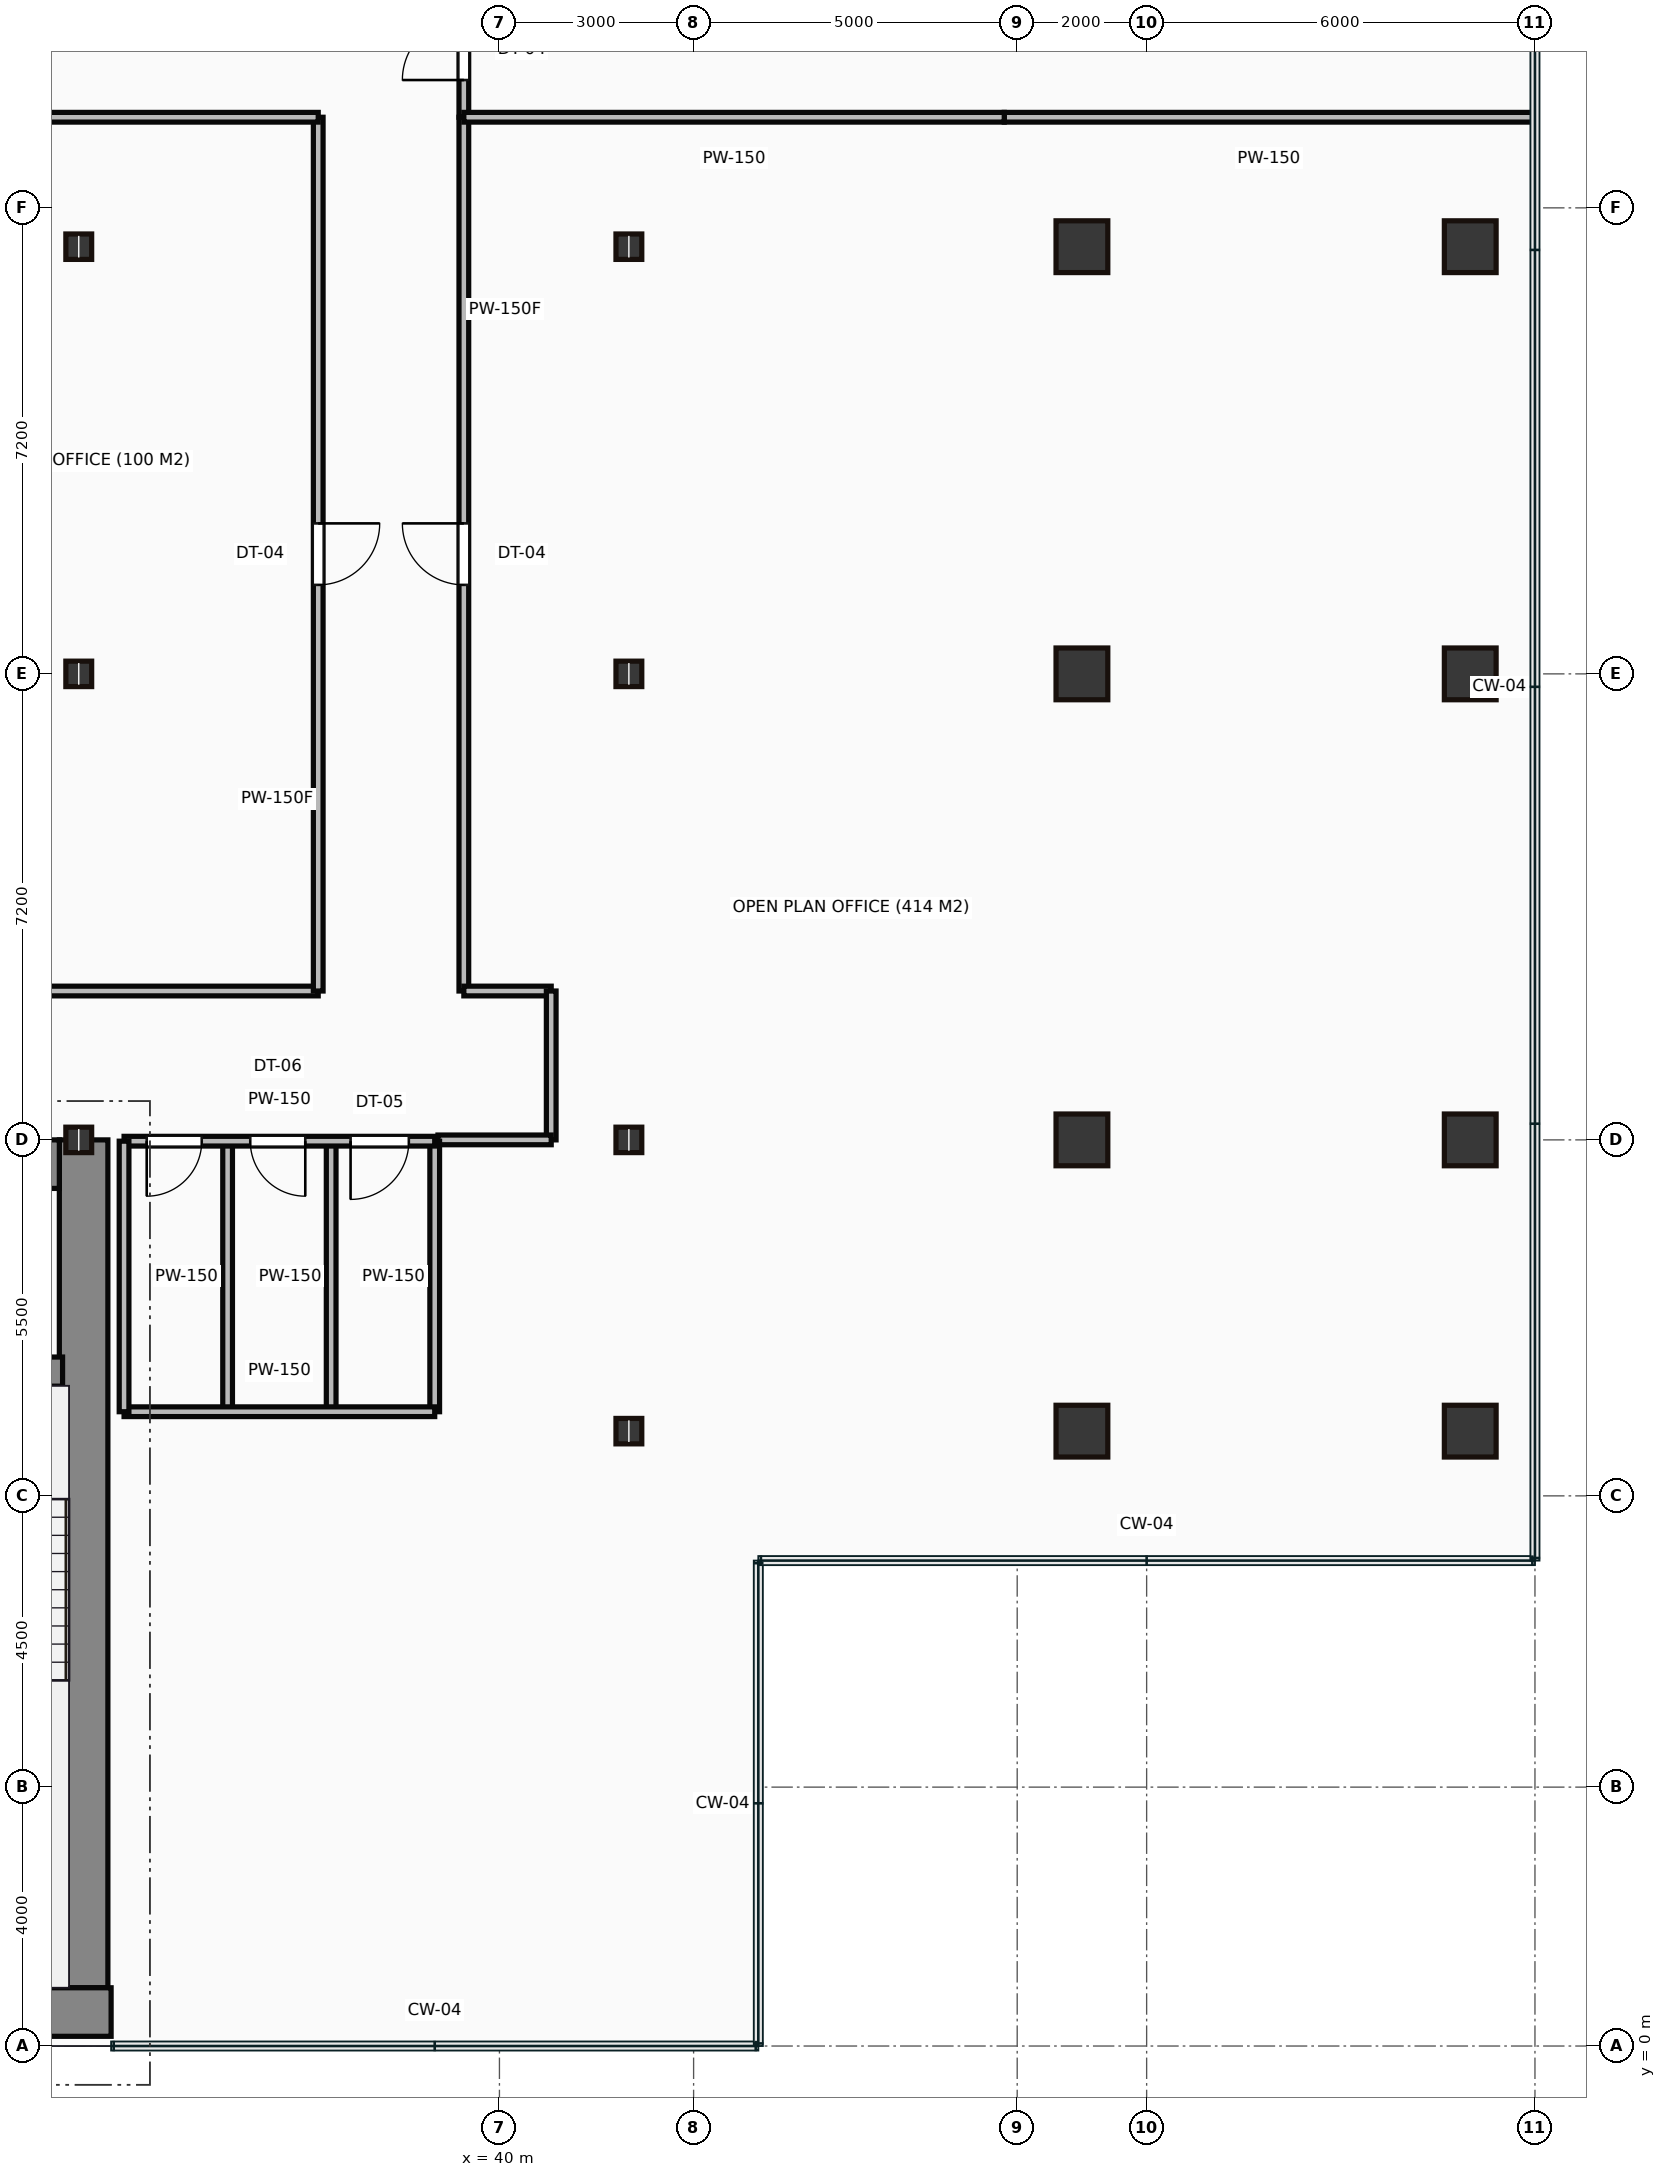
"""IFC4 building model, lengths in metres.
Left out: names, types, materials, properties, quantities, classifications, styles, units other than length and angle.
Written with IfcOpenShell. Run it as: python <this file> out.ifc"""

import sys

from ifc_helpers import new_model, si_unit, direction, frame, frame_2d, origin, origin_2d, place, context, subcontext, project, spatial, rectangle, hollow_rectangle, i_section, extrude, source, transform, mapped, element, fill, save


model = new_model("IFC4")
c1 = context("Model", 3, precision=1e-05, world=origin(), true_north=direction((0.0, 1.0)))
c2 = subcontext(c1, "Body", "Model", "MODEL_VIEW")
j1 = project(units=[si_unit("LENGTHUNIT", "METRE"), si_unit("PLANEANGLEUNIT", "RADIAN")], contexts=[c1])
p1 = place(None, origin())
s1 = spatial("IfcSite", under=j1, at=p1, CompositionType="ELEMENT")
p2 = place(p1, origin())
s2 = spatial("IfcBuilding", under=s1, at=p2, CompositionType="ELEMENT")
p3 = place(p2, frame((0.0, 0.0, 103.25)))
s3 = spatial("IfcBuildingStorey", under=s2, at=p3, CompositionType="ELEMENT", Elevation=103.25)
m1 = source(origin(), c2, "Body", "SweptSolid", [
    extrude(rectangle(XDim=29.5, YDim=0.75, at=frame_2d((14.75, 0.0))), origin(), (0.0, 0.0, 1.0), 3.65),
])
p4 = place(p3, frame((4.5, 0.525, 0.0), z_axis=(0.0, 0.0, 1.0), x_axis=(1.0, 0.0, 0.0)))
e1 = element("IfcWall", 1, at=p4, inside=s3, PredefinedType="SHEAR", context=c2, shape_type="MappedRepresentation", body=[
    mapped(m1, transform((0.0, 0.0, 0.0))),
])
m2 = source(origin(), c2, "Body", "SweptSolid", [
    extrude(rectangle(XDim=13.1, YDim=0.75, at=frame_2d((6.55, 0.0))), origin(), (0.0, 0.0, 1.0), 3.65),
])
p5 = place(p3, frame((33.575, 0.9, 0.0), z_axis=(0.0, 0.0, 1.0), x_axis=(0.0, 1.0, 0.0)))
e2 = element("IfcWall", 2, at=p5, inside=s3, PredefinedType="SHEAR", context=c2, shape_type="MappedRepresentation", body=[
    mapped(m2, transform((0.0, 0.0, 0.0))),
])
m3 = source(origin(), c2, "Body", "SweptSolid", [
    extrude(rectangle(XDim=12.6, YDim=0.75, at=frame_2d((6.3, 0.0))), origin(), (0.0, 0.0, 1.0), 3.65),
])
p6 = place(p3, frame((20.6, 13.625, 0.0), z_axis=(0.0, 0.0, 1.0), x_axis=(1.0, 0.0, 0.0)))
e3 = element("IfcWall", 3, at=p6, inside=s3, PredefinedType="SHEAR", context=c2, shape_type="MappedRepresentation", body=[
    mapped(m3, transform((0.0, 0.0, 0.0))),
])
p7 = place(p6, frame((9.25, 0.0, 0.0)))
e4 = element("IfcOpeningElement", 4, at=p7, cuts=e3, PredefinedType="OPENING", context=c2, shape_type="SweptSolid", body=[
    extrude(rectangle(XDim=1.1, YDim=2.15, at=frame_2d((0.55, 1.075))), frame((0.0, 0.385, 0.0), z_axis=(0.0, -1.0, 0.0), x_axis=(1.0, 0.0, 0.0)), (0.0, 0.0, 1.0), 0.77),
])
m4 = source(origin(), c2, "Body", "SweptSolid", [
    extrude(rectangle(XDim=3.39, YDim=0.45, at=frame_2d((1.695, 0.0))), origin(), (0.0, 0.0, 1.0), 3.65),
])
p8 = place(p3, frame((29.86, 10.42, 0.0), z_axis=(0.0, 0.0, 1.0), x_axis=(1.0, 0.0, 0.0)))
e5 = element("IfcWall", 5, at=p8, inside=s3, PredefinedType="SHEAR", context=c2, shape_type="MappedRepresentation", body=[
    mapped(m4, transform((0.0, 0.0, 0.0))),
])
p9 = place(p8, frame((1.1, 0.0, 0.0)))
e6 = element("IfcOpeningElement", 6, at=p9, cuts=e5, PredefinedType="OPENING", context=c2, shape_type="SweptSolid", body=[
    extrude(rectangle(XDim=1.1, YDim=2.15, at=frame_2d((0.55, 1.075))), frame((0.0, 0.235, 0.0), z_axis=(0.0, -1.0, 0.0), x_axis=(1.0, 0.0, 0.0)), (0.0, 0.0, 1.0), 0.47),
])
m5 = source(origin(), c2, "Body", "SweptSolid", [
    extrude(i_section(OverallWidth=0.399, OverallDepth=0.393, WebThickness=0.023, FlangeThickness=0.037, at=origin_2d()), origin(), (0.0, 0.0, 1.0), 3.65),
])
for number, where, z_axis, x_axis in (
    (7, (33.5, 14.0, 0.0), (0.0, 0.0, 1.0), (1.0, 0.0, 0.0)),
    (8, (33.5, 21.2, 0.0), (0.0, 0.0, 1.0), (1.0, 0.0, 0.0)),
    (9, (33.5, 27.8, 0.0), (0.0, 0.0, 1.0), (1.0, 0.0, 0.0)),
    (10, (42.0, 9.5, 0.0), (0.0, 0.0, 1.0), (1.0, 0.0, 0.0)),
    (11, (42.0, 14.0, 0.0), (0.0, 0.0, 1.0), (1.0, 0.0, 0.0)),
    (12, (42.0, 21.2, 0.0), (0.0, 0.0, 1.0), (1.0, 0.0, 0.0)),
    (13, (42.0, 27.8, 0.0), (0.0, 0.0, 1.0), (1.0, 0.0, 0.0)),
):
    element("IfcColumn", number, at=place(p3, frame(where, z_axis=z_axis, x_axis=x_axis)), inside=s3, PredefinedType="COLUMN", context=c2, shape_type="MappedRepresentation", body=[
        mapped(m5, transform((0.0, 0.0, 0.0))),
    ])
m6 = source(origin(), c2, "Body", "SweptSolid", [
    extrude(hollow_rectangle(XDim=0.8, YDim=0.8, WallThickness=0.04, at=origin_2d()), origin(), (0.0, 0.0, 1.0), 3.65),
])
for number, where, z_axis, x_axis in (
    (14, (49.0, 9.5, 0.0), (0.0, 0.0, 1.0), (1.0, 0.0, 0.0)),
    (15, (49.0, 14.0, 0.0), (0.0, 0.0, 1.0), (1.0, 0.0, 0.0)),
    (16, (49.0, 21.2, 0.0), (0.0, 0.0, 1.0), (1.0, 0.0, 0.0)),
    (17, (49.0, 27.8, 0.0), (0.0, 0.0, 1.0), (1.0, 0.0, 0.0)),
    (18, (55.0, 9.5, 0.0), (0.0, 0.0, 1.0), (1.0, 0.0, 0.0)),
    (19, (55.0, 14.0, 0.0), (0.0, 0.0, 1.0), (1.0, 0.0, 0.0)),
    (20, (55.0, 21.2, 0.0), (0.0, 0.0, 1.0), (1.0, 0.0, 0.0)),
    (21, (55.0, 27.8, 0.0), (0.0, 0.0, 1.0), (1.0, 0.0, 0.0)),
):
    element("IfcColumn", number, at=place(p3, frame(where, z_axis=z_axis, x_axis=x_axis)), inside=s3, PredefinedType="COLUMN", context=c2, shape_type="MappedRepresentation", body=[
        mapped(m6, transform((0.0, 0.0, 0.0))),
    ])
m7 = source(origin(), c2, "Body", "SweptSolid", [
    extrude(rectangle(XDim=4.8, YDim=0.15, at=frame_2d((2.4, 0.0))), origin(), (0.0, 0.0, 1.0), 2.702),
])
p10 = place(p3, frame((34.2, 13.98, 0.0), z_axis=(0.0, 0.0, 1.0), x_axis=(1.0, 0.0, 0.0)))
e22 = element("IfcWall", 22, at=p10, inside=s3, PredefinedType="PARTITIONING", context=c2, shape_type="MappedRepresentation", body=[
    mapped(m7, transform((0.0, 0.0, 0.0))),
])
p11 = place(p10, frame((0.35, 0.0, 0.0)))
e23 = element("IfcOpeningElement", 23, at=p11, cuts=e22, PredefinedType="OPENING", context=c2, shape_type="SweptSolid", body=[
    extrude(rectangle(XDim=0.85, YDim=2.1, at=frame_2d((0.425, 1.05))), frame((0.0, 0.085, 0.0), z_axis=(0.0, -1.0, 0.0), x_axis=(1.0, 0.0, 0.0)), (0.0, 0.0, 1.0), 0.17),
])
p12 = place(p10, frame((1.95, 0.0, 0.0)))
e24 = element("IfcOpeningElement", 24, at=p12, cuts=e22, PredefinedType="OPENING", context=c2, shape_type="SweptSolid", body=[
    extrude(rectangle(XDim=0.85, YDim=2.1, at=frame_2d((0.425, 1.05))), frame((0.0, 0.085, 0.0), z_axis=(0.0, -1.0, 0.0), x_axis=(1.0, 0.0, 0.0)), (0.0, 0.0, 1.0), 0.17),
])
p13 = place(p10, frame((3.5, 0.0, 0.0)))
e25 = element("IfcOpeningElement", 25, at=p13, cuts=e22, PredefinedType="OPENING", context=c2, shape_type="SweptSolid", body=[
    extrude(rectangle(XDim=0.9, YDim=2.1, at=frame_2d((0.45, 1.05))), frame((0.0, 0.085, 0.0), z_axis=(0.0, -1.0, 0.0), x_axis=(1.0, 0.0, 0.0)), (0.0, 0.0, 1.0), 0.17),
])
m8 = source(origin(), c2, "Body", "SweptSolid", [
    extrude(rectangle(XDim=4.8, YDim=0.15, at=frame_2d((2.4, 0.0))), origin(), (0.0, 0.0, 1.0), 3.4),
])
p14 = place(p3, frame((34.2, 9.8, 0.0), z_axis=(0.0, 0.0, 1.0), x_axis=(1.0, 0.0, 0.0)))
e26 = element("IfcWall", 26, at=p14, inside=s3, PredefinedType="PARTITIONING", context=c2, shape_type="MappedRepresentation", body=[
    mapped(m8, transform((0.0, 0.0, 0.0))),
])
m9 = source(origin(), c2, "Body", "SweptSolid", [
    extrude(rectangle(XDim=4.18, YDim=0.15, at=frame_2d((2.09, 0.0))), origin(), (0.0, 0.0, 1.0), 3.4),
])
for number, where, z_axis, x_axis in (
    (27, (39.0, 9.8, 0.0), (0.0, 0.0, 1.0), (0.0, 1.0, 0.0)),
    (28, (34.2, 9.8, 0.0), (0.0, 0.0, 1.0), (0.0, 1.0, 0.0)),
    (29, (35.8, 9.8, 0.0), (0.0, 0.0, 1.0), (0.0, 1.0, 0.0)),
    (30, (37.4, 9.8, 0.0), (0.0, 0.0, 1.0), (0.0, 1.0, 0.0)),
):
    element("IfcWall", number, at=place(p3, frame(where, z_axis=z_axis, x_axis=x_axis)), inside=s3, PredefinedType="PARTITIONING", context=c2, shape_type="MappedRepresentation", body=[
        mapped(m9, transform((0.0, 0.0, 0.0))),
    ])
m10 = source(origin(), c2, "Body", "SweptSolid", [
    extrude(rectangle(XDim=32.6, YDim=0.15, at=frame_2d((16.3, 0.0))), origin(), (0.0, 0.0, 1.0), 3.4),
])
p15 = place(p3, frame((4.6, 16.3, 0.0), z_axis=(0.0, 0.0, 1.0), x_axis=(1.0, 0.0, 0.0)))
e31 = element("IfcWall", 31, at=p15, inside=s3, PredefinedType="PARTITIONING", context=c2, shape_type="MappedRepresentation", body=[
    mapped(m10, transform((0.0, 0.0, 0.0))),
])
p16 = place(p15, frame((2.255, 0.0, 0.0)))
e32 = element("IfcOpeningElement", 32, at=p16, cuts=e31, PredefinedType="OPENING", context=c2, shape_type="SweptSolid", body=[
    extrude(rectangle(XDim=0.95, YDim=2.15, at=frame_2d((0.475, 1.075))), frame((0.0, 0.085, 0.0), z_axis=(0.0, -1.0, 0.0), x_axis=(1.0, 0.0, 0.0)), (0.0, 0.0, 1.0), 0.17),
])
m11 = source(origin(), c2, "Body", "SweptSolid", [
    extrude(rectangle(XDim=13.5, YDim=0.15, at=frame_2d((6.75, 0.0))), origin(), (0.0, 0.0, 1.0), 3.4),
])
p17 = place(p3, frame((37.2, 16.3, 0.0), z_axis=(0.0, 0.0, 1.0), x_axis=(0.0, 1.0, 0.0)))
e33 = element("IfcWall", 33, at=p17, inside=s3, PredefinedType="PARTITIONING", context=c2, shape_type="MappedRepresentation", body=[
    mapped(m11, transform((0.0, 0.0, 0.0))),
])
p18 = place(p17, frame((6.275, 0.0, 0.0)))
e34 = element("IfcOpeningElement", 34, at=p18, cuts=e33, PredefinedType="OPENING", context=c2, shape_type="SweptSolid", body=[
    extrude(rectangle(XDim=0.95, YDim=2.15, at=frame_2d((0.475, 1.075))), frame((0.0, 0.085, 0.0), z_axis=(0.0, -1.0, 0.0), x_axis=(1.0, 0.0, 0.0)), (0.0, 0.0, 1.0), 0.17),
])
p19 = place(p3, frame((37.2, 29.8, 0.0), z_axis=(0.0, 0.0, 1.0), x_axis=(-1.0, 0.0, 0.0)))
e35 = element("IfcWall", 35, at=p19, inside=s3, PredefinedType="PARTITIONING", context=c2, shape_type="MappedRepresentation", body=[
    mapped(m10, transform((0.0, 0.0, 0.0))),
])
p20 = place(p19, frame((22.025, 0.0, 0.0)))
e36 = element("IfcOpeningElement", 36, at=p20, cuts=e35, PredefinedType="OPENING", context=c2, shape_type="SweptSolid", body=[
    extrude(rectangle(XDim=0.95, YDim=2.15, at=frame_2d((0.475, 1.075))), frame((0.0, 0.085, 0.0), z_axis=(0.0, -1.0, 0.0), x_axis=(1.0, 0.0, 0.0)), (0.0, 0.0, 1.0), 0.17),
])
p21 = place(p19, frame((12.025, 0.0, 0.0)))
e37 = element("IfcOpeningElement", 37, at=p21, cuts=e35, PredefinedType="OPENING", context=c2, shape_type="SweptSolid", body=[
    extrude(rectangle(XDim=0.95, YDim=2.15, at=frame_2d((0.475, 1.075))), frame((0.0, 0.085, 0.0), z_axis=(0.0, -1.0, 0.0), x_axis=(1.0, 0.0, 0.0)), (0.0, 0.0, 1.0), 0.17),
])
m12 = source(origin(), c2, "Body", "SweptSolid", [
    extrude(rectangle(XDim=2.1, YDim=0.15, at=frame_2d((1.05, 0.0))), origin(), (0.0, 0.0, 1.0), 3.4),
])
p22 = place(p3, frame((39.45, 31.9, 0.0), z_axis=(0.0, 0.0, 1.0), x_axis=(0.0, -1.0, 0.0)))
e38 = element("IfcWall", 38, at=p22, inside=s3, PredefinedType="PARTITIONING", context=c2, shape_type="MappedRepresentation", body=[
    mapped(m12, transform((0.0, 0.0, 0.0))),
])
p23 = place(p22, frame((0.575, 0.0, 0.0)))
e39 = element("IfcOpeningElement", 39, at=p23, cuts=e38, PredefinedType="OPENING", context=c2, shape_type="SweptSolid", body=[
    extrude(rectangle(XDim=0.95, YDim=2.15, at=frame_2d((0.475, 1.075))), frame((0.0, 0.085, 0.0), z_axis=(0.0, -1.0, 0.0), x_axis=(1.0, 0.0, 0.0)), (0.0, 0.0, 1.0), 0.17),
])
p24 = place(p3, frame((39.45, 29.8, 0.0), z_axis=(0.0, 0.0, 1.0), x_axis=(0.0, -1.0, 0.0)))
e40 = element("IfcWall", 40, at=p24, inside=s3, PredefinedType="PARTITIONING", context=c2, shape_type="MappedRepresentation", body=[
    mapped(m11, transform((0.0, 0.0, 0.0))),
])
p25 = place(p24, frame((6.275, 0.0, 0.0)))
e41 = element("IfcOpeningElement", 41, at=p25, cuts=e40, PredefinedType="OPENING", context=c2, shape_type="SweptSolid", body=[
    extrude(rectangle(XDim=0.95, YDim=2.15, at=frame_2d((0.475, 1.075))), frame((0.0, 0.085, 0.0), z_axis=(0.0, -1.0, 0.0), x_axis=(1.0, 0.0, 0.0)), (0.0, 0.0, 1.0), 0.17),
])
m13 = source(origin(), c2, "Body", "SweptSolid", [
    extrude(rectangle(XDim=1.35, YDim=0.15, at=frame_2d((0.675, 0.0))), origin(), (0.0, 0.0, 1.0), 3.4),
])
p26 = place(p3, frame((39.45, 16.3, 0.0), z_axis=(0.0, 0.0, 1.0), x_axis=(1.0, 0.0, 0.0)))
e42 = element("IfcWall", 42, at=p26, inside=s3, PredefinedType="PARTITIONING", context=c2, shape_type="MappedRepresentation", body=[
    mapped(m13, transform((0.0, 0.0, 0.0))),
])
m14 = source(origin(), c2, "Body", "SweptSolid", [
    extrude(rectangle(XDim=2.3, YDim=0.15, at=frame_2d((1.15, 0.0))), origin(), (0.0, 0.0, 1.0), 3.4),
])
p27 = place(p3, frame((40.8, 16.3, 0.0), z_axis=(0.0, 0.0, 1.0), x_axis=(0.0, -1.0, 0.0)))
e43 = element("IfcWall", 43, at=p27, inside=s3, PredefinedType="PARTITIONING", context=c2, shape_type="MappedRepresentation", body=[
    mapped(m14, transform((0.0, 0.0, 0.0))),
])
m15 = source(origin(), c2, "Body", "SweptSolid", [
    extrude(rectangle(XDim=1.75, YDim=0.15, at=frame_2d((0.875, 0.0))), origin(), (0.0, 0.0, 1.0), 2.702),
])
p28 = place(p3, frame((40.8, 14.0, 0.0), z_axis=(0.0, 0.0, 1.0), x_axis=(-1.0, 0.0, 0.0)))
e44 = element("IfcWall", 44, at=p28, inside=s3, PredefinedType="PARTITIONING", context=c2, shape_type="MappedRepresentation", body=[
    mapped(m15, transform((0.0, 0.0, 0.0))),
])
m16 = source(origin(), c2, "Body", "SweptSolid", [
    extrude(rectangle(XDim=8.18, YDim=0.15, at=frame_2d((4.09, 0.0))), origin(), (0.0, 0.0, 1.0), 3.4),
])
p29 = place(p3, frame((55.98, 29.8, 0.0), z_axis=(0.0, 0.0, 1.0), x_axis=(-1.0, 0.0, 0.0)))
e45 = element("IfcWall", 45, at=p29, inside=s3, PredefinedType="PARTITIONING", context=c2, shape_type="MappedRepresentation", body=[
    mapped(m16, transform((0.0, 0.0, 0.0))),
])
m17 = source(origin(), c2, "Body", "SweptSolid", [
    extrude(rectangle(XDim=8.35, YDim=0.15, at=frame_2d((4.175, 0.0))), origin(), (0.0, 0.0, 1.0), 3.4),
])
p30 = place(p3, frame((47.8, 29.8, 0.0), z_axis=(0.0, 0.0, 1.0), x_axis=(-1.0, 0.0, 0.0)))
e46 = element("IfcWall", 46, at=p30, inside=s3, PredefinedType="PARTITIONING", context=c2, shape_type="MappedRepresentation", body=[
    mapped(m17, transform((0.0, 0.0, 0.0))),
])
m18 = source(origin(), c2, "Body", "SweptSolid", [
    extrude(rectangle(XDim=0.85, YDim=2.1, at=frame_2d((0.425, 1.05))), frame((0.0, 0.025, 0.0), z_axis=(0.0, -1.0, 0.0), x_axis=(1.0, 0.0, 0.0)), (0.0, 0.0, 1.0), 0.05),
])
p31 = place(p11, frame((0.85, 0.0, 0.0), z_axis=(0.0, 0.0, 1.0), x_axis=(-1.0, 0.0, 0.0)))
e47 = element("IfcDoor", 47, at=p31, inside=s3, OperationType="SINGLE_SWING_LEFT", PredefinedType="DOOR", context=c2, shape_type="MappedRepresentation", body=[
    mapped(m18, transform((0.0, 0.0, 0.0))),
])
fill(e23, e47)
p32 = place(p12, frame((0.85, 0.0, 0.0), z_axis=(0.0, 0.0, 1.0), x_axis=(-1.0, 0.0, 0.0)))
e48 = element("IfcDoor", 48, at=p32, inside=s3, OperationType="SINGLE_SWING_RIGHT", PredefinedType="DOOR", context=c2, shape_type="MappedRepresentation", body=[
    mapped(m18, transform((0.0, 0.0, 0.0))),
])
fill(e24, e48)
m19 = source(origin(), c2, "Body", "SweptSolid", [
    extrude(rectangle(XDim=0.9, YDim=2.1, at=frame_2d((0.45, 1.05))), frame((0.0, 0.025, 0.0), z_axis=(0.0, -1.0, 0.0), x_axis=(1.0, 0.0, 0.0)), (0.0, 0.0, 1.0), 0.05),
])
p33 = place(p13, frame((0.9, 0.0, 0.0), z_axis=(0.0, 0.0, 1.0), x_axis=(-1.0, 0.0, 0.0)))
e49 = element("IfcDoor", 49, at=p33, inside=s3, OperationType="SINGLE_SWING_LEFT", PredefinedType="DOOR", context=c2, shape_type="MappedRepresentation", body=[
    mapped(m19, transform((0.0, 0.0, 0.0))),
])
fill(e25, e49)
m20 = source(origin(), c2, "Body", "SweptSolid", [
    extrude(rectangle(XDim=0.95, YDim=2.15, at=frame_2d((0.475, 1.075))), frame((0.0, 0.025, 0.0), z_axis=(0.0, -1.0, 0.0), x_axis=(1.0, 0.0, 0.0)), (0.0, 0.0, 1.0), 0.05),
])
p34 = place(p18, origin())
e50 = element("IfcDoor", 50, at=p34, inside=s3, OperationType="SINGLE_SWING_RIGHT", PredefinedType="DOOR", context=c2, shape_type="MappedRepresentation", body=[
    mapped(m20, transform((0.0, 0.0, 0.0))),
])
fill(e34, e50)
p35 = place(p23, origin())
e51 = element("IfcDoor", 51, at=p35, inside=s3, OperationType="SINGLE_SWING_RIGHT", PredefinedType="DOOR", context=c2, shape_type="MappedRepresentation", body=[
    mapped(m20, transform((0.0, 0.0, 0.0))),
])
fill(e39, e51)
p36 = place(p25, origin())
e52 = element("IfcDoor", 52, at=p36, inside=s3, OperationType="SINGLE_SWING_LEFT", PredefinedType="DOOR", context=c2, shape_type="MappedRepresentation", body=[
    mapped(m20, transform((0.0, 0.0, 0.0))),
])
fill(e41, e52)
save(model, sys.argv[1])
